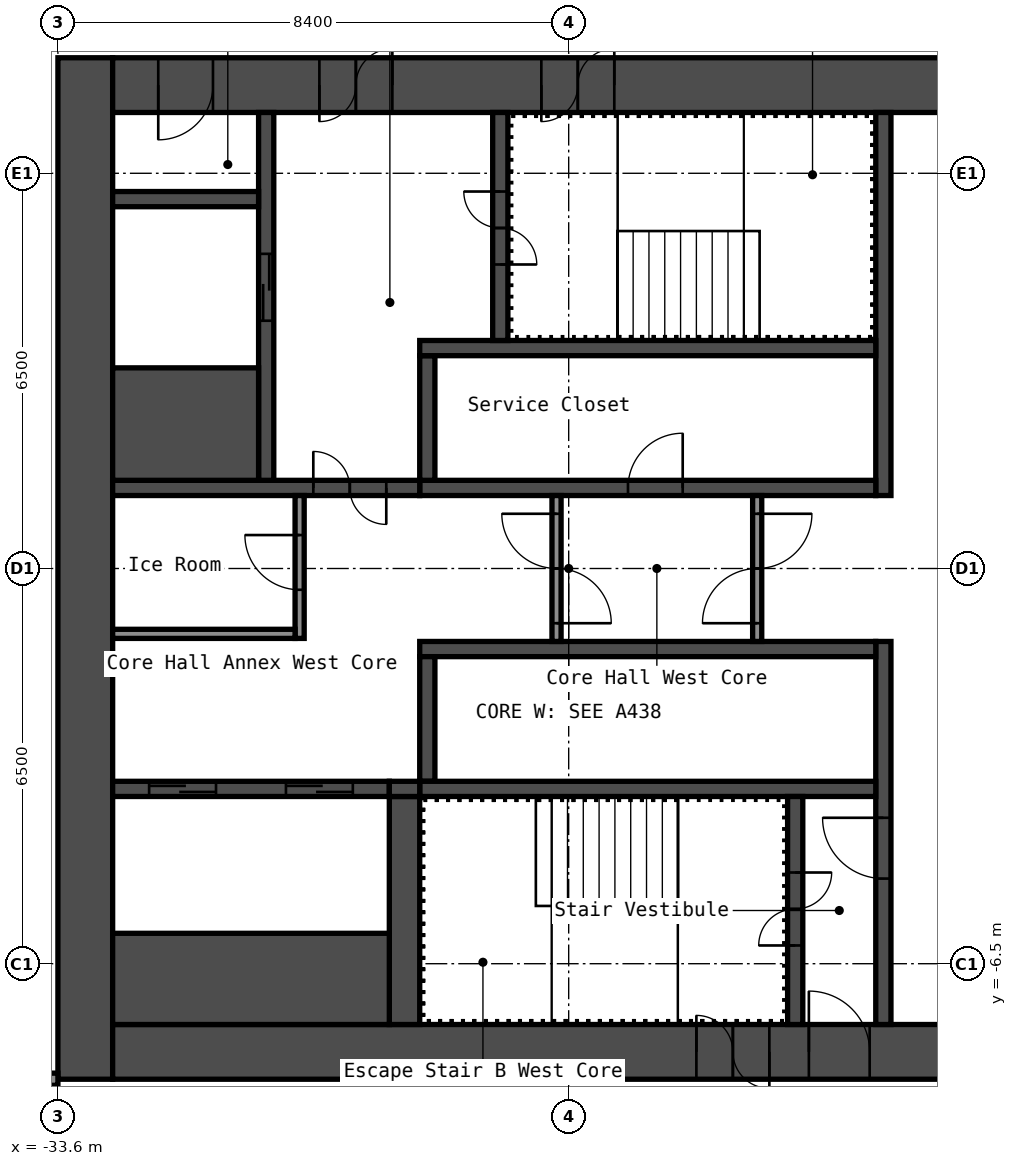
"""IFC4 building model, lengths in metres.
Left out: names, types, materials, properties, quantities, classifications, styles, units other than length and angle.
Written with IfcOpenShell. Run it as: python <this file> out.ifc"""

import sys

from ifc_helpers import new_model, si_unit, direction, frame, frame_2d, origin, place, context, subcontext, project, spatial, rectangle, extrude, element, fill, save


model = new_model("IFC4")
c1 = context("Model", 3, precision=1e-05, world=origin(), true_north=direction((0.0, 1.0)))
c2 = subcontext(c1, "Body", "Model", "MODEL_VIEW")
j1 = project(units=[si_unit("LENGTHUNIT", "METRE"), si_unit("PLANEANGLEUNIT", "RADIAN")], contexts=[c1])
p1 = place(None, origin())
s1 = spatial("IfcSite", under=j1, at=p1, CompositionType="ELEMENT")
p2 = place(p1, origin())
s2 = spatial("IfcBuilding", under=s1, at=p2, CompositionType="ELEMENT")
p3 = place(p2, frame((0.0, 0.0, 264.6)))
s3 = spatial("IfcBuildingStorey", under=s2, at=p3, CompositionType="ELEMENT", Elevation=264.6)
p4 = place(p3, frame((-33.15, -8.4, 0.0), z_axis=(0.0, 0.0, 1.0), x_axis=(0.0, 1.0, 0.0)))
e1 = element("IfcWall", 1, at=p4, inside=s3, PredefinedType="SHEAR", context=c2, shape_type="SweptSolid", body=[
    extrude(rectangle(XDim=16.8, YDim=0.9, at=frame_2d((8.4, 0.0))), origin(), (0.0, 0.0, 1.0), 5.55),
])
p5 = place(p3, frame((-32.7, 7.95, 0.0), z_axis=(0.0, 0.0, 1.0), x_axis=(1.0, 0.0, 0.0)))
e2 = element("IfcWall", 2, at=p5, inside=s3, PredefinedType="SHEAR", context=c2, shape_type="SweptSolid", body=[
    extrude(rectangle(XDim=15.0, YDim=0.9, at=frame_2d((7.5, 0.0))), origin(), (0.0, 0.0, 1.0), 5.55),
])
p6 = place(p5, frame((3.4, 0.0, 0.0)))
e3 = element("IfcOpeningElement", 3, at=p6, cuts=e2, PredefinedType="OPENING", context=c2, shape_type="SweptSolid", body=[
    extrude(rectangle(XDim=1.2, YDim=2.1, at=frame_2d((0.6, 1.05))), frame((0.0, 0.46, 0.0), z_axis=(0.0, -1.0, 0.0), x_axis=(1.0, 0.0, 0.0)), (0.0, 0.0, 1.0), 0.92),
])
p7 = place(p5, frame((0.75, 0.0, 0.0)))
e4 = element("IfcOpeningElement", 4, at=p7, cuts=e2, PredefinedType="OPENING", context=c2, shape_type="SweptSolid", body=[
    extrude(rectangle(XDim=0.9, YDim=2.1, at=frame_2d((0.45, 1.05))), frame((0.0, 0.46, 0.0), z_axis=(0.0, -1.0, 0.0), x_axis=(1.0, 0.0, 0.0)), (0.0, 0.0, 1.0), 0.92),
])
p8 = place(p5, frame((7.05, 0.0, 0.0)))
e5 = element("IfcOpeningElement", 5, at=p8, cuts=e2, PredefinedType="OPENING", context=c2, shape_type="SweptSolid", body=[
    extrude(rectangle(XDim=1.2, YDim=2.1, at=frame_2d((0.6, 1.05))), frame((0.0, 0.46, 0.0), z_axis=(0.0, -1.0, 0.0), x_axis=(1.0, 0.0, 0.0)), (0.0, 0.0, 1.0), 0.92),
])
p9 = place(p3, frame((-32.7, -7.95, 0.0), z_axis=(0.0, 0.0, 1.0), x_axis=(1.0, 0.0, 0.0)))
e6 = element("IfcWall", 6, at=p9, inside=s3, PredefinedType="SHEAR", context=c2, shape_type="SweptSolid", body=[
    extrude(rectangle(XDim=15.0, YDim=0.9, at=frame_2d((7.5, 0.0))), origin(), (0.0, 0.0, 1.0), 5.55),
])
p10 = place(p9, frame((11.45, 0.0, 0.0)))
e7 = element("IfcOpeningElement", 7, at=p10, cuts=e6, PredefinedType="OPENING", context=c2, shape_type="SweptSolid", body=[
    extrude(rectangle(XDim=1.0, YDim=2.1, at=frame_2d((0.5, 1.05))), frame((0.0, 0.46, 0.0), z_axis=(0.0, -1.0, 0.0), x_axis=(1.0, 0.0, 0.0)), (0.0, 0.0, 1.0), 0.92),
])
p11 = place(p9, frame((9.6, 0.0, 0.0)))
e8 = element("IfcOpeningElement", 8, at=p11, cuts=e6, PredefinedType="OPENING", context=c2, shape_type="SweptSolid", body=[
    extrude(rectangle(XDim=1.2, YDim=2.1, at=frame_2d((0.6, 1.05))), frame((0.0, 0.46, 0.0), z_axis=(0.0, -1.0, 0.0), x_axis=(1.0, 0.0, 0.0)), (0.0, 0.0, 1.0), 0.92),
])
p12 = place(p3, frame((-20.025, 1.2, 0.0), z_axis=(0.0, 0.0, 1.0), x_axis=(0.0, 1.0, 0.0)))
e9 = element("IfcWall", 9, at=p12, inside=s3, PredefinedType="SHEAR", context=c2, shape_type="SweptSolid", body=[
    extrude(rectangle(XDim=6.3, YDim=0.25, at=frame_2d((3.15, 0.0))), origin(), (0.0, 0.0, 1.0), 5.55),
])
p13 = place(p3, frame((-20.025, -7.5, 0.0), z_axis=(0.0, 0.0, 1.0), x_axis=(0.0, 1.0, 0.0)))
e10 = element("IfcWall", 10, at=p13, inside=s3, PredefinedType="SHEAR", context=c2, shape_type="SweptSolid", body=[
    extrude(rectangle(XDim=6.3, YDim=0.25, at=frame_2d((3.15, 0.0))), origin(), (0.0, 0.0, 1.0), 5.55),
])
p14 = place(p13, frame((2.4, 0.0, 0.0)))
e11 = element("IfcOpeningElement", 11, at=p14, cuts=e10, PredefinedType="OPENING", context=c2, shape_type="SweptSolid", body=[
    extrude(rectangle(XDim=1.0, YDim=2.1, at=frame_2d((0.5, 1.05))), frame((0.0, 0.135, 0.0), z_axis=(0.0, -1.0, 0.0), x_axis=(1.0, 0.0, 0.0)), (0.0, 0.0, 1.0), 0.27),
])
p15 = place(p3, frame((-27.65, 1.325, 0.0), z_axis=(0.0, 0.0, 1.0), x_axis=(1.0, 0.0, 0.0)))
e12 = element("IfcWall", 12, at=p15, inside=s3, PredefinedType="SHEAR", context=c2, shape_type="SweptSolid", body=[
    extrude(rectangle(XDim=7.5, YDim=0.25, at=frame_2d((3.75, 0.0))), origin(), (0.0, 0.0, 1.0), 5.55),
])
p16 = place(p15, frame((3.425, 0.0, 0.0)))
e13 = element("IfcOpeningElement", 13, at=p16, cuts=e12, PredefinedType="OPENING", context=c2, shape_type="SweptSolid", body=[
    extrude(rectangle(XDim=0.9, YDim=2.1, at=frame_2d((0.45, 1.05))), frame((0.0, 0.135, 0.0), z_axis=(0.0, -1.0, 0.0), x_axis=(1.0, 0.0, 0.0)), (0.0, 0.0, 1.0), 0.27),
])
p17 = place(p3, frame((-27.525, 1.45, 0.0), z_axis=(0.0, 0.0, 1.0), x_axis=(0.0, 1.0, 0.0)))
e14 = element("IfcWall", 14, at=p17, inside=s3, PredefinedType="SHEAR", context=c2, shape_type="SweptSolid", body=[
    extrude(rectangle(XDim=2.05, YDim=0.25, at=frame_2d((1.025, 0.0))), origin(), (0.0, 0.0, 1.0), 5.55),
])
p18 = place(p3, frame((-27.65, 3.625, 0.0), z_axis=(0.0, 0.0, 1.0), x_axis=(1.0, 0.0, 0.0)))
e15 = element("IfcWall", 15, at=p18, inside=s3, PredefinedType="SHEAR", context=c2, shape_type="SweptSolid", body=[
    extrude(rectangle(XDim=7.5, YDim=0.25, at=frame_2d((3.75, 0.0))), origin(), (0.0, 0.0, 1.0), 5.55),
])
p19 = place(p3, frame((-26.325, 3.75, 0.0), z_axis=(0.0, 0.0, 1.0), x_axis=(0.0, 1.0, 0.0)))
e16 = element("IfcWall", 16, at=p19, inside=s3, PredefinedType="SHEAR", context=c2, shape_type="SweptSolid", body=[
    extrude(rectangle(XDim=3.75, YDim=0.25, at=frame_2d((1.875, 0.0))), origin(), (0.0, 0.0, 1.0), 5.55),
])
p20 = place(p19, frame((1.25, 0.0, 0.0)))
e17 = element("IfcOpeningElement", 17, at=p20, cuts=e16, PredefinedType="OPENING", context=c2, shape_type="SweptSolid", body=[
    extrude(rectangle(XDim=1.2, YDim=2.1, at=frame_2d((0.6, 1.05))), frame((0.0, 0.135, 0.0), z_axis=(0.0, -1.0, 0.0), x_axis=(1.0, 0.0, 0.0)), (0.0, 0.0, 1.0), 0.27),
])
p21 = place(p3, frame((-32.7, 1.325, 0.0), z_axis=(0.0, 0.0, 1.0), x_axis=(1.0, 0.0, 0.0)))
e18 = element("IfcWall", 18, at=p21, inside=s3, PredefinedType="SHEAR", context=c2, shape_type="SweptSolid", body=[
    extrude(rectangle(XDim=5.05, YDim=0.25, at=frame_2d((2.525, 0.0))), origin(), (0.0, 0.0, 1.0), 5.55),
])
p22 = place(p21, frame((3.3, 0.0, 0.0)))
e19 = element("IfcOpeningElement", 19, at=p22, cuts=e18, PredefinedType="OPENING", context=c2, shape_type="SweptSolid", body=[
    extrude(rectangle(XDim=1.2, YDim=2.1, at=frame_2d((0.6, 1.05))), frame((0.0, 0.135, 0.0), z_axis=(0.0, -1.0, 0.0), x_axis=(1.0, 0.0, 0.0)), (0.0, 0.0, 1.0), 0.27),
])
p23 = place(p3, frame((-30.175, 1.45, 0.0), z_axis=(0.0, 0.0, 1.0), x_axis=(0.0, 1.0, 0.0)))
e20 = element("IfcWall", 20, at=p23, inside=s3, PredefinedType="SHEAR", context=c2, shape_type="SweptSolid", body=[
    extrude(rectangle(XDim=6.05, YDim=0.25, at=frame_2d((3.025, 0.0))), origin(), (0.0, 0.0, 1.0), 5.55),
])
p24 = place(p23, frame((2.625, 0.0, 0.0)))
e21 = element("IfcOpeningElement", 21, at=p24, cuts=e20, PredefinedType="OPENING", context=c2, shape_type="SweptSolid", body=[
    extrude(rectangle(XDim=1.1, YDim=2.1, at=frame_2d((0.55, 1.05))), frame((0.0, 0.135, 0.0), z_axis=(0.0, -1.0, 0.0), x_axis=(1.0, 0.0, 0.0)), (0.0, 0.0, 1.0), 0.27),
])
p25 = place(p3, frame((-32.7, 2.375, 0.0), z_axis=(0.0, 0.0, 1.0), x_axis=(1.0, 0.0, 0.0)))
e22 = element("IfcWall", 22, at=p25, inside=s3, PredefinedType="SHEAR", context=c2, shape_type="SweptSolid", body=[
    extrude(rectangle(XDim=2.4, YDim=1.85, at=frame_2d((1.2, 0.0))), origin(), (0.0, 0.0, 1.0), 5.55),
])
p26 = place(p3, frame((-32.7, 6.075, 0.0), z_axis=(0.0, 0.0, 1.0), x_axis=(1.0, 0.0, 0.0)))
e23 = element("IfcWall", 23, at=p26, inside=s3, PredefinedType="SHEAR", context=c2, shape_type="SweptSolid", body=[
    extrude(rectangle(XDim=2.4, YDim=0.25, at=frame_2d((1.2, 0.0))), origin(), (0.0, 0.0, 1.0), 5.55),
])
p27 = place(p3, frame((-27.65, -1.325, 0.0), z_axis=(0.0, 0.0, 1.0), x_axis=(1.0, 0.0, 0.0)))
e24 = element("IfcWall", 24, at=p27, inside=s3, PredefinedType="SHEAR", context=c2, shape_type="SweptSolid", body=[
    extrude(rectangle(XDim=7.5, YDim=0.25, at=frame_2d((3.75, 0.0))), origin(), (0.0, 0.0, 1.0), 5.55),
])
p28 = place(p3, frame((-27.525, -3.5, 0.0), z_axis=(0.0, 0.0, 1.0), x_axis=(0.0, 1.0, 0.0)))
e25 = element("IfcWall", 25, at=p28, inside=s3, PredefinedType="SHEAR", context=c2, shape_type="SweptSolid", body=[
    extrude(rectangle(XDim=2.05, YDim=0.25, at=frame_2d((1.025, 0.0))), origin(), (0.0, 0.0, 1.0), 5.55),
])
p29 = place(p3, frame((-27.65, -3.625, 0.0), z_axis=(0.0, 0.0, 1.0), x_axis=(1.0, 0.0, 0.0)))
e26 = element("IfcWall", 26, at=p29, inside=s3, PredefinedType="SHEAR", context=c2, shape_type="SweptSolid", body=[
    extrude(rectangle(XDim=7.5, YDim=0.25, at=frame_2d((3.75, 0.0))), origin(), (0.0, 0.0, 1.0), 5.55),
])
p30 = place(p3, frame((-21.475, -7.5, 0.0), z_axis=(0.0, 0.0, 1.0), x_axis=(0.0, 1.0, 0.0)))
e27 = element("IfcWall", 27, at=p30, inside=s3, PredefinedType="SHEAR", context=c2, shape_type="SweptSolid", body=[
    extrude(rectangle(XDim=3.75, YDim=0.25, at=frame_2d((1.875, 0.0))), origin(), (0.0, 0.0, 1.0), 5.55),
])
p31 = place(p30, frame((1.3, 0.0, 0.0)))
e28 = element("IfcOpeningElement", 28, at=p31, cuts=e27, PredefinedType="OPENING", context=c2, shape_type="SweptSolid", body=[
    extrude(rectangle(XDim=1.2, YDim=2.1, at=frame_2d((0.6, 1.05))), frame((0.0, 0.135, 0.0), z_axis=(0.0, -1.0, 0.0), x_axis=(1.0, 0.0, 0.0)), (0.0, 0.0, 1.0), 0.27),
])
p32 = place(p3, frame((-27.9, -7.5, 0.0), z_axis=(0.0, 0.0, 1.0), x_axis=(0.0, 1.0, 0.0)))
e29 = element("IfcWall", 29, at=p32, inside=s3, PredefinedType="SHEAR", context=c2, shape_type="SweptSolid", body=[
    extrude(rectangle(XDim=3.75, YDim=0.5, at=frame_2d((1.875, 0.0))), origin(), (0.0, 0.0, 1.0), 5.55),
])
p33 = place(p3, frame((-32.7, -3.625, 0.0), z_axis=(0.0, 0.0, 1.0), x_axis=(1.0, 0.0, 0.0)))
e30 = element("IfcWall", 30, at=p33, inside=s3, PredefinedType="SHEAR", context=c2, shape_type="SweptSolid", body=[
    extrude(rectangle(XDim=4.55, YDim=0.25, at=frame_2d((2.275, 0.0))), origin(), (0.0, 0.0, 1.0), 5.55),
])
p34 = place(p33, frame((2.85, 0.0, 0.0)))
e31 = element("IfcOpeningElement", 31, at=p34, cuts=e30, PredefinedType="OPENING", context=c2, shape_type="SweptSolid", body=[
    extrude(rectangle(XDim=1.1, YDim=2.1, at=frame_2d((0.55, 1.05))), frame((0.0, 0.135, 0.0), z_axis=(0.0, -1.0, 0.0), x_axis=(1.0, 0.0, 0.0)), (0.0, 0.0, 1.0), 0.27),
])
p35 = place(p33, frame((0.6, 0.0, 0.0)))
e32 = element("IfcOpeningElement", 32, at=p35, cuts=e30, PredefinedType="OPENING", context=c2, shape_type="SweptSolid", body=[
    extrude(rectangle(XDim=1.1, YDim=2.1, at=frame_2d((0.55, 1.05))), frame((0.0, 0.135, 0.0), z_axis=(0.0, -1.0, 0.0), x_axis=(1.0, 0.0, 0.0)), (0.0, 0.0, 1.0), 0.27),
])
p36 = place(p3, frame((-32.7, -6.75, 0.0), z_axis=(0.0, 0.0, 1.0), x_axis=(1.0, 0.0, 0.0)))
e33 = element("IfcWall", 33, at=p36, inside=s3, PredefinedType="SHEAR", context=c2, shape_type="SweptSolid", body=[
    extrude(rectangle(XDim=4.55, YDim=1.5, at=frame_2d((2.275, 0.0))), origin(), (0.0, 0.0, 1.0), 5.55),
])
p37 = place(p3, frame((-28.15, -3.625, 0.0), z_axis=(0.0, 0.0, 1.0), x_axis=(1.0, 0.0, 0.0)))
e34 = element("IfcWall", 34, at=p37, inside=s3, PredefinedType="SHEAR", context=c2, shape_type="SweptSolid", body=[
    extrude(rectangle(XDim=0.5, YDim=0.25, at=frame_2d((0.25, 0.0))), origin(), (0.0, 0.0, 1.0), 5.55),
])
p38 = place(p3, frame((-22.1, -1.2, 0.0), z_axis=(0.0, 0.0, 1.0), x_axis=(0.0, 1.0, 0.0)))
e35 = element("IfcWall", 35, at=p38, inside=s3, PredefinedType="PARTITIONING", context=c2, shape_type="SweptSolid", body=[
    extrude(rectangle(XDim=2.4, YDim=0.15, at=frame_2d((1.2, 0.0))), origin(), (0.0, 0.0, 1.0), 5.55),
])
p39 = place(p38, frame((0.3, 0.0, 0.0)))
e36 = element("IfcOpeningElement", 36, at=p39, cuts=e35, PredefinedType="OPENING", context=c2, shape_type="SweptSolid", body=[
    extrude(rectangle(XDim=1.8, YDim=2.1, at=frame_2d((0.9, 1.05))), frame((0.0, 0.085, 0.0), z_axis=(0.0, -1.0, 0.0), x_axis=(1.0, 0.0, 0.0)), (0.0, 0.0, 1.0), 0.17),
])
p40 = place(p3, frame((-25.4, -1.2, 0.0), z_axis=(0.0, 0.0, 1.0), x_axis=(0.0, 1.0, 0.0)))
e37 = element("IfcWall", 37, at=p40, inside=s3, PredefinedType="PARTITIONING", context=c2, shape_type="SweptSolid", body=[
    extrude(rectangle(XDim=2.4, YDim=0.15, at=frame_2d((1.2, 0.0))), origin(), (0.0, 0.0, 1.0), 5.55),
])
p41 = place(p40, frame((0.3, 0.0, 0.0)))
e38 = element("IfcOpeningElement", 38, at=p41, cuts=e37, PredefinedType="OPENING", context=c2, shape_type="SweptSolid", body=[
    extrude(rectangle(XDim=1.8, YDim=2.1, at=frame_2d((0.9, 1.05))), frame((0.0, 0.085, 0.0), z_axis=(0.0, -1.0, 0.0), x_axis=(1.0, 0.0, 0.0)), (0.0, 0.0, 1.0), 0.17),
])
p42 = place(p3, frame((-29.625, -1.15, 0.0), z_axis=(0.0, 0.0, 1.0), x_axis=(0.0, 1.0, 0.0)))
e39 = element("IfcWall", 39, at=p42, inside=s3, PredefinedType="PARTITIONING", context=c2, shape_type="SweptSolid", body=[
    extrude(rectangle(XDim=2.35, YDim=0.15, at=frame_2d((1.175, 0.0))), origin(), (0.0, 0.0, 1.0), 5.55),
])
p43 = place(p42, frame((0.8, 0.0, 0.0)))
e40 = element("IfcOpeningElement", 40, at=p43, cuts=e39, PredefinedType="OPENING", context=c2, shape_type="SweptSolid", body=[
    extrude(rectangle(XDim=0.9, YDim=2.1, at=frame_2d((0.45, 1.05))), frame((0.0, 0.085, 0.0), z_axis=(0.0, -1.0, 0.0), x_axis=(1.0, 0.0, 0.0)), (0.0, 0.0, 1.0), 0.17),
])
p44 = place(p3, frame((-32.7, -1.075, 0.0), z_axis=(0.0, 0.0, 1.0), x_axis=(1.0, 0.0, 0.0)))
e41 = element("IfcWall", 41, at=p44, inside=s3, PredefinedType="PARTITIONING", context=c2, shape_type="SweptSolid", body=[
    extrude(rectangle(XDim=3.0, YDim=0.15, at=frame_2d((1.5, 0.0))), origin(), (0.0, 0.0, 1.0), 5.55),
])
p45 = place(p3, frame((-37.164, -8.4, 0.0), z_axis=(0.0, 0.0, 1.0), x_axis=(1.0, 0.0, 0.0)))
e42 = element("IfcWall", 42, at=p45, inside=s3, PredefinedType="PARTITIONING", context=c2, shape_type="SweptSolid", body=[
    extrude(rectangle(XDim=3.564, YDim=0.2, at=frame_2d((1.782, 0.0))), origin(), (0.0, 0.0, 1.0), 5.55),
])
p46 = place(p45, frame((0.652, 0.0, 0.0)))
e43 = element("IfcOpeningElement", 43, at=p46, cuts=e42, PredefinedType="OPENING", context=c2, shape_type="SweptSolid", body=[
    extrude(rectangle(XDim=1.6, YDim=2.1, at=frame_2d((0.8, 1.05))), frame((0.0, 0.11, 0.0), z_axis=(0.0, -1.0, 0.0), x_axis=(1.0, 0.0, 0.0)), (0.0, 0.0, 1.0), 0.22),
])
p47 = place(p6, origin())
e44 = element("IfcDoor", 44, at=p47, inside=s3, OperationType="DOUBLE_DOOR_SINGLE_SWING", PredefinedType="DOOR", context=c2, shape_type="SweptSolid", body=[
    extrude(rectangle(XDim=1.2, YDim=2.1, at=frame_2d((0.6, 1.05))), frame((0.0, 0.025, 0.0), z_axis=(0.0, -1.0, 0.0), x_axis=(1.0, 0.0, 0.0)), (0.0, 0.0, 1.0), 0.05),
])
fill(e3, e44)
p48 = place(p7, origin())
e45 = element("IfcDoor", 45, at=p48, inside=s3, OperationType="SINGLE_SWING_LEFT", PredefinedType="DOOR", context=c2, shape_type="SweptSolid", body=[
    extrude(rectangle(XDim=0.9, YDim=2.1, at=frame_2d((0.45, 1.05))), frame((0.0, 0.025, 0.0), z_axis=(0.0, -1.0, 0.0), x_axis=(1.0, 0.0, 0.0)), (0.0, 0.0, 1.0), 0.05),
])
fill(e4, e45)
p49 = place(p10, origin())
e46 = element("IfcDoor", 46, at=p49, inside=s3, OperationType="SINGLE_SWING_RIGHT", PredefinedType="DOOR", context=c2, shape_type="SweptSolid", body=[
    extrude(rectangle(XDim=1.0, YDim=2.1, at=frame_2d((0.5, 1.05))), frame((0.0, 0.025, 0.0), z_axis=(0.0, -1.0, 0.0), x_axis=(1.0, 0.0, 0.0)), (0.0, 0.0, 1.0), 0.05),
])
fill(e7, e46)
p50 = place(p8, origin())
e47 = element("IfcDoor", 47, at=p50, inside=s3, OperationType="DOUBLE_DOOR_SINGLE_SWING", PredefinedType="DOOR", context=c2, shape_type="SweptSolid", body=[
    extrude(rectangle(XDim=1.2, YDim=2.1, at=frame_2d((0.6, 1.05))), frame((0.0, 0.025, 0.0), z_axis=(0.0, -1.0, 0.0), x_axis=(1.0, 0.0, 0.0)), (0.0, 0.0, 1.0), 0.05),
])
fill(e5, e47)
p51 = place(p11, origin())
e48 = element("IfcDoor", 48, at=p51, inside=s3, OperationType="DOUBLE_DOOR_SINGLE_SWING", PredefinedType="DOOR", context=c2, shape_type="SweptSolid", body=[
    extrude(rectangle(XDim=1.2, YDim=2.1, at=frame_2d((0.6, 1.05))), frame((0.0, 0.025, 0.0), z_axis=(0.0, -1.0, 0.0), x_axis=(1.0, 0.0, 0.0)), (0.0, 0.0, 1.0), 0.05),
])
fill(e8, e48)
p52 = place(p20, origin())
e49 = element("IfcDoor", 49, at=p52, inside=s3, OperationType="DOUBLE_DOOR_SINGLE_SWING", PredefinedType="DOOR", context=c2, shape_type="SweptSolid", body=[
    extrude(rectangle(XDim=1.2, YDim=2.1, at=frame_2d((0.6, 1.05))), frame((0.0, 0.025, 0.0), z_axis=(0.0, -1.0, 0.0), x_axis=(1.0, 0.0, 0.0)), (0.0, 0.0, 1.0), 0.05),
])
fill(e17, e49)
p53 = place(p31, origin())
e50 = element("IfcDoor", 50, at=p53, inside=s3, OperationType="DOUBLE_DOOR_SINGLE_SWING", PredefinedType="DOOR", context=c2, shape_type="SweptSolid", body=[
    extrude(rectangle(XDim=1.2, YDim=2.1, at=frame_2d((0.6, 1.05))), frame((0.0, 0.025, 0.0), z_axis=(0.0, -1.0, 0.0), x_axis=(1.0, 0.0, 0.0)), (0.0, 0.0, 1.0), 0.05),
])
fill(e28, e50)
p54 = place(p14, origin())
e51 = element("IfcDoor", 51, at=p54, inside=s3, OperationType="SINGLE_SWING_LEFT", PredefinedType="DOOR", context=c2, shape_type="SweptSolid", body=[
    extrude(rectangle(XDim=1.0, YDim=2.1, at=frame_2d((0.5, 1.05))), frame((0.0, 0.025, 0.0), z_axis=(0.0, -1.0, 0.0), x_axis=(1.0, 0.0, 0.0)), (0.0, 0.0, 1.0), 0.05),
])
fill(e11, e51)
p55 = place(p22, origin())
e52 = element("IfcDoor", 52, at=p55, inside=s3, OperationType="DOUBLE_DOOR_SINGLE_SWING", PredefinedType="DOOR", context=c2, shape_type="SweptSolid", body=[
    extrude(rectangle(XDim=1.2, YDim=2.1, at=frame_2d((0.6, 1.05))), frame((0.0, 0.025, 0.0), z_axis=(0.0, -1.0, 0.0), x_axis=(1.0, 0.0, 0.0)), (0.0, 0.0, 1.0), 0.05),
])
fill(e19, e52)
p56 = place(p39, origin())
e53 = element("IfcDoor", 53, at=p56, inside=s3, OperationType="DOUBLE_DOOR_SINGLE_SWING", PredefinedType="DOOR", context=c2, shape_type="SweptSolid", body=[
    extrude(rectangle(XDim=1.8, YDim=2.1, at=frame_2d((0.9, 1.05))), frame((0.0, 0.025, 0.0), z_axis=(0.0, -1.0, 0.0), x_axis=(1.0, 0.0, 0.0)), (0.0, 0.0, 1.0), 0.05),
])
fill(e36, e53)
p57 = place(p41, origin())
e54 = element("IfcDoor", 54, at=p57, inside=s3, OperationType="DOUBLE_DOOR_SINGLE_SWING", PredefinedType="DOOR", context=c2, shape_type="SweptSolid", body=[
    extrude(rectangle(XDim=1.8, YDim=2.1, at=frame_2d((0.9, 1.05))), frame((0.0, 0.025, 0.0), z_axis=(0.0, -1.0, 0.0), x_axis=(1.0, 0.0, 0.0)), (0.0, 0.0, 1.0), 0.05),
])
fill(e38, e54)
p58 = place(p43, origin())
e55 = element("IfcDoor", 55, at=p58, inside=s3, OperationType="SINGLE_SWING_LEFT", PredefinedType="DOOR", context=c2, shape_type="SweptSolid", body=[
    extrude(rectangle(XDim=0.9, YDim=2.1, at=frame_2d((0.45, 1.05))), frame((0.0, 0.025, 0.0), z_axis=(0.0, -1.0, 0.0), x_axis=(1.0, 0.0, 0.0)), (0.0, 0.0, 1.0), 0.05),
])
fill(e40, e55)
p59 = place(p16, origin())
e56 = element("IfcDoor", 56, at=p59, inside=s3, OperationType="SINGLE_SWING_LEFT", PredefinedType="DOOR", context=c2, shape_type="SweptSolid", body=[
    extrude(rectangle(XDim=0.9, YDim=2.1, at=frame_2d((0.45, 1.05))), frame((0.0, 0.025, 0.0), z_axis=(0.0, -1.0, 0.0), x_axis=(1.0, 0.0, 0.0)), (0.0, 0.0, 1.0), 0.05),
])
fill(e13, e56)
p60 = place(p24, origin())
e57 = element("IfcDoor", 57, at=p60, inside=s3, OperationType="DOUBLE_DOOR_SLIDING", PredefinedType="DOOR", context=c2, shape_type="SweptSolid", body=[
    extrude(rectangle(XDim=1.1, YDim=2.1, at=frame_2d((0.55, 1.05))), frame((0.0, 0.025, 0.0), z_axis=(0.0, -1.0, 0.0), x_axis=(1.0, 0.0, 0.0)), (0.0, 0.0, 1.0), 0.05),
])
fill(e21, e57)
p61 = place(p34, origin())
e58 = element("IfcDoor", 58, at=p61, inside=s3, OperationType="DOUBLE_DOOR_SLIDING", PredefinedType="DOOR", context=c2, shape_type="SweptSolid", body=[
    extrude(rectangle(XDim=1.1, YDim=2.1, at=frame_2d((0.55, 1.05))), frame((0.0, 0.025, 0.0), z_axis=(0.0, -1.0, 0.0), x_axis=(1.0, 0.0, 0.0)), (0.0, 0.0, 1.0), 0.05),
])
fill(e31, e58)
p62 = place(p35, origin())
e59 = element("IfcDoor", 59, at=p62, inside=s3, OperationType="DOUBLE_DOOR_SLIDING", PredefinedType="DOOR", context=c2, shape_type="SweptSolid", body=[
    extrude(rectangle(XDim=1.1, YDim=2.1, at=frame_2d((0.55, 1.05))), frame((0.0, 0.025, 0.0), z_axis=(0.0, -1.0, 0.0), x_axis=(1.0, 0.0, 0.0)), (0.0, 0.0, 1.0), 0.05),
])
fill(e32, e59)
save(model, sys.argv[1])
